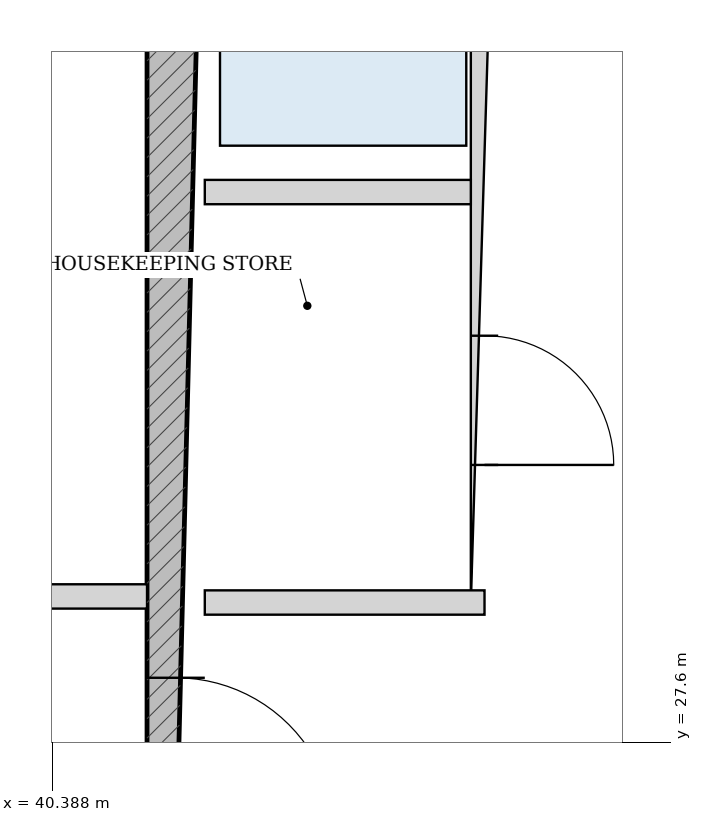
"""IFC4 building model, lengths in metres.
Left out: names, types, materials, properties, quantities, classifications, styles, units other than length and angle.
Written with IfcOpenShell. Run it as: python <this file> out.ifc"""

import sys

from ifc_helpers import new_model, si_unit, direction, frame, frame_2d, origin, place, context, subcontext, project, spatial, rectangle, extrude, source, transform, mapped, element, fill, save


model = new_model("IFC4")
c1 = context("Model", 3, precision=1e-05, world=origin(), true_north=direction((-0.2419218956, 0.970295726276)))
c2 = subcontext(c1, "Body", "Model", "MODEL_VIEW")
j1 = project(units=[si_unit("LENGTHUNIT", "METRE"), si_unit("PLANEANGLEUNIT", "RADIAN")], contexts=[c1])
p1 = place(None, origin())
s1 = spatial("IfcSite", under=j1, at=p1, CompositionType="ELEMENT")
p2 = place(p1, origin())
s2 = spatial("IfcBuilding", under=s1, at=p2, CompositionType="ELEMENT")
p3 = place(p2, frame((0.0, 0.0, 243.0)))
s3 = spatial("IfcBuildingStorey", under=s2, at=p3, CompositionType="ELEMENT", Elevation=243.0)
p4 = place(p3, frame((41.2, 19.175, 0.0), z_axis=(0.0, 0.0, 1.0), x_axis=(0.0, 1.0, 0.0)))
e1 = element("IfcWall", 1, at=p4, inside=s3, PredefinedType="SHEAR", context=c2, shape_type="SweptSolid", body=[
    extrude(rectangle(XDim=15.25, YDim=0.38, at=frame_2d((7.625, 0.0))), origin(), (0.0, 0.0, 1.0), 4.94),
])
p5 = place(p4, frame((7.8, 0.0, 0.0)))
e2 = element("IfcOpeningElement", 2, at=p5, cuts=e1, PredefinedType="OPENING", context=c2, shape_type="SweptSolid", body=[
    extrude(rectangle(XDim=1.05, YDim=2.15, at=frame_2d((0.525, 1.075))), frame((0.0, 0.2, 0.0), z_axis=(0.0, -1.0, 0.0), x_axis=(1.0, 0.0, 0.0)), (0.0, 0.0, 1.0), 0.4),
])
p6 = place(p3, frame((43.23, 28.52, 0.0), z_axis=(0.0, 0.0, 1.0), x_axis=(0.0, 1.0, 0.0)))
e3 = element("IfcWall", 3, at=p6, inside=s3, PredefinedType="PARTITIONING", context=c2, shape_type="SweptSolid", body=[
    extrude(rectangle(XDim=5.905, YDim=0.18, at=frame_2d((2.953, 0.0))), origin(), (0.0, 0.0, 1.0), 4.94),
])
p7 = place(p6, frame((0.905, 0.0, 0.0)))
e4 = element("IfcOpeningElement", 4, at=p7, cuts=e3, PredefinedType="OPENING", context=c2, shape_type="SweptSolid", body=[
    extrude(rectangle(XDim=0.85, YDim=2.1, at=frame_2d((0.425, 1.05))), frame((0.0, 0.1, 0.0), z_axis=(0.0, -1.0, 0.0), x_axis=(1.0, 0.0, 0.0)), (0.0, 0.0, 1.0), 0.2),
])
p8 = place(p6, frame((3.655, 0.0, 0.0)))
e5 = element("IfcOpeningElement", 5, at=p8, cuts=e3, PredefinedType="OPENING", context=c2, shape_type="SweptSolid", body=[
    extrude(rectangle(XDim=1.15, YDim=2.2, at=frame_2d((0.575, 1.1))), frame((0.0, 0.1, 0.0), z_axis=(0.0, -1.0, 0.0), x_axis=(1.0, 0.0, 0.0)), (0.0, 0.0, 1.0), 0.2),
])
p9 = place(p3, frame((41.39, 31.22, 0.0), z_axis=(0.0, 0.0, 1.0), x_axis=(1.0, 0.0, 0.0)))
e6 = element("IfcWall", 6, at=p9, inside=s3, PredefinedType="PARTITIONING", context=c2, shape_type="SweptSolid", body=[
    extrude(rectangle(XDim=1.75, YDim=0.16, at=frame_2d((0.875, 0.0))), origin(), (0.0, 0.0, 1.0), 4.94),
])
p10 = place(p3, frame((41.39, 28.52, 0.0), z_axis=(0.0, 0.0, 1.0), x_axis=(1.0, 0.0, 0.0)))
e7 = element("IfcWall", 7, at=p10, inside=s3, PredefinedType="PARTITIONING", context=c2, shape_type="SweptSolid", body=[
    extrude(rectangle(XDim=1.84, YDim=0.16, at=frame_2d((0.92, 0.0))), origin(), (0.0, 0.0, 1.0), 4.94),
])
p11 = place(p3, frame((34.99, 28.56, 0.0), z_axis=(0.0, 0.0, 1.0), x_axis=(1.0, 0.0, 0.0)))
e8 = element("IfcWall", 8, at=p11, inside=s3, PredefinedType="PARTITIONING", context=c2, shape_type="SweptSolid", body=[
    extrude(rectangle(XDim=6.02, YDim=0.16, at=frame_2d((3.01, 0.0))), origin(), (0.0, 0.0, 1.0), 4.94),
])
p12 = place(p11, frame((2.585, 0.0, 0.0)))
e9 = element("IfcOpeningElement", 9, at=p12, cuts=e8, PredefinedType="OPENING", context=c2, shape_type="SweptSolid", body=[
    extrude(rectangle(XDim=0.85, YDim=2.1, at=frame_2d((0.425, 1.05))), frame((0.0, 0.09, 0.0), z_axis=(0.0, -1.0, 0.0), x_axis=(1.0, 0.0, 0.0)), (0.0, 0.0, 1.0), 0.18),
])
m1 = source(origin(), c2, "Body", "SweptSolid", [
    extrude(rectangle(XDim=1.05, YDim=2.15, at=frame_2d((0.525, 1.075))), frame((0.0, 0.025, 0.0), z_axis=(0.0, -1.0, 0.0), x_axis=(1.0, 0.0, 0.0)), (0.0, 0.0, 1.0), 0.05),
])
p13 = place(p5, frame((1.05, 0.0, 0.0), z_axis=(0.0, 0.0, 1.0), x_axis=(-1.0, 0.0, 0.0)))
e10 = element("IfcDoor", 10, at=p13, inside=s3, OperationType="SINGLE_SWING_RIGHT", PredefinedType="DOOR", context=c2, shape_type="MappedRepresentation", body=[
    mapped(m1, transform((0.0, 0.0, 0.0), scale=1.0)),
])
fill(e2, e10)
m2 = source(origin(), c2, "Body", "SweptSolid", [
    extrude(rectangle(XDim=0.85, YDim=2.1, at=frame_2d((0.425, 1.05))), frame((0.0, 0.025, 0.0), z_axis=(0.0, -1.0, 0.0), x_axis=(1.0, 0.0, 0.0)), (0.0, 0.0, 1.0), 0.05),
])
p14 = place(p7, frame((0.85, 0.0, 0.0), z_axis=(0.0, 0.0, 1.0), x_axis=(-1.0, 0.0, 0.0)))
e11 = element("IfcDoor", 11, at=p14, inside=s3, OperationType="SINGLE_SWING_RIGHT", PredefinedType="DOOR", context=c2, shape_type="MappedRepresentation", body=[
    mapped(m2, transform((0.0, 0.0, 0.0), scale=1.0)),
])
fill(e4, e11)
save(model, sys.argv[1])
